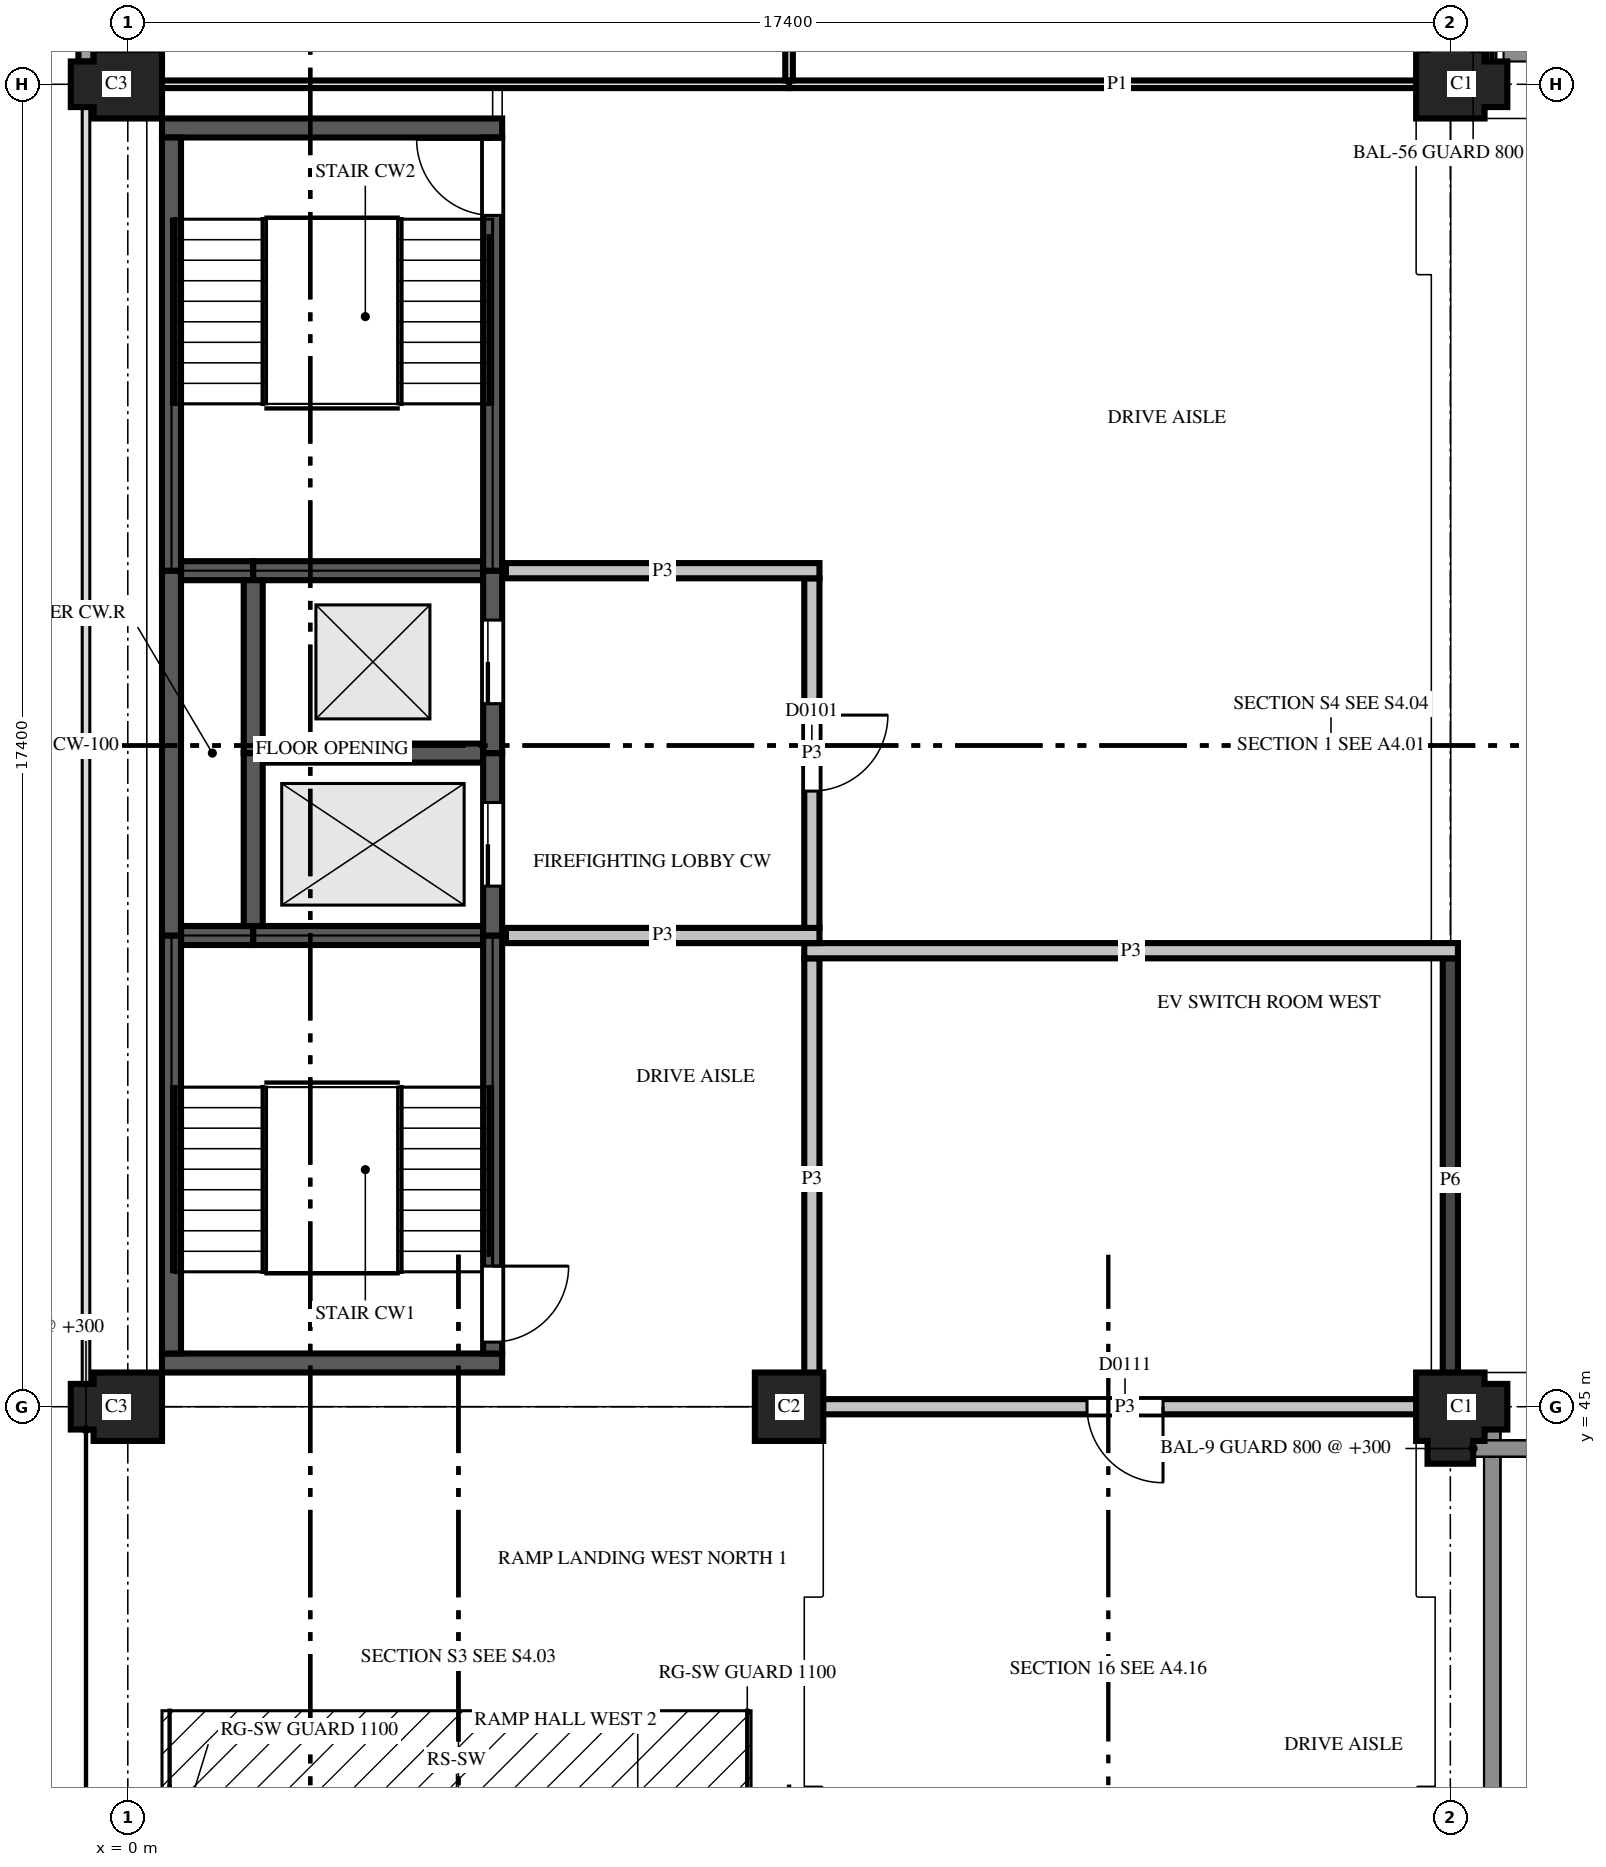
"""IFC4 building model, lengths in metres.
Left out: names, types, materials, properties, quantities, classifications, styles, units other than length and angle.
Written with IfcOpenShell. Run it as: python <this file> out.ifc"""

import sys

from ifc_helpers import new_model, si_unit, direction, frame, frame_2d, origin, place, context, subcontext, project, spatial, polyline, rectangle, outline, extrude, element, fill, save


model = new_model("IFC4")
c1 = context("Model", 3, precision=1e-05, world=origin(), true_north=direction((0.0, 1.0)))
c2 = subcontext(c1, "Body", "Model", "MODEL_VIEW")
j1 = project(units=[si_unit("LENGTHUNIT", "METRE"), si_unit("PLANEANGLEUNIT", "RADIAN")], contexts=[c1])
p1 = place(None, origin())
s1 = spatial("IfcSite", under=j1, at=p1, CompositionType="ELEMENT")
p2 = place(p1, origin())
s2 = spatial("IfcBuilding", under=s1, at=p2, CompositionType="ELEMENT")
p3 = place(p2, frame((0.0, 0.0, 4.5)))
s3 = spatial("IfcBuildingStorey", under=s2, at=p3, CompositionType="ELEMENT", Elevation=4.5)
p4 = place(p3, frame((0.0, 45.0, 0.0), z_axis=(0.0, 0.0, 1.0), x_axis=(-1.0, 0.0, 0.0)))
e1 = element("IfcColumn", 1, at=p4, inside=s3, PredefinedType="COLUMN", context=c2, shape_type="SweptSolid", body=[
    extrude(outline(polyline([(-0.45, -0.45), (0.45, -0.45), (0.45, -0.3), (0.75, -0.3), (0.75, 0.3), (0.45, 0.3), (0.45, 0.45), (-0.45, 0.45), (-0.45, -0.45)])), origin(), (0.0, 0.0, 1.0), 3.7),
])
p5 = place(p3, frame((8.7, 45.0, 0.0), z_axis=(0.0, 0.0, 1.0), x_axis=(1.0, 0.0, 0.0)))
e2 = element("IfcColumn", 2, at=p5, inside=s3, PredefinedType="COLUMN", context=c2, shape_type="SweptSolid", body=[
    extrude(outline(polyline([(-0.45, -0.45), (0.45, -0.45), (0.45, 0.45), (-0.45, 0.45), (-0.45, -0.45)])), origin(), (0.0, 0.0, 1.0), 3.7),
])
p6 = place(p3, frame((17.4, 45.0, 0.0), z_axis=(0.0, 0.0, 1.0), x_axis=(0.0, -1.0, 0.0)))
e3 = element("IfcColumn", 3, at=p6, inside=s3, PredefinedType="COLUMN", context=c2, shape_type="SweptSolid", body=[
    extrude(outline(polyline([(-0.45, -0.45), (0.45, -0.45), (0.45, -0.3), (0.75, -0.3), (0.75, 0.3), (0.45, 0.3), (0.45, 0.45), (0.3, 0.45), (0.3, 0.75), (-0.3, 0.75), (-0.3, 0.45), (-0.45, 0.45), (-0.45, -0.45)])), origin(), (0.0, 0.0, 1.0), 3.7),
])
p7 = place(p3, frame((0.0, 62.4, 0.0), z_axis=(0.0, 0.0, 1.0), x_axis=(-1.0, 0.0, 0.0)))
e4 = element("IfcColumn", 4, at=p7, inside=s3, PredefinedType="COLUMN", context=c2, shape_type="SweptSolid", body=[
    extrude(outline(polyline([(-0.45, -0.45), (0.45, -0.45), (0.45, -0.3), (0.75, -0.3), (0.75, 0.3), (0.45, 0.3), (0.45, 0.45), (-0.45, 0.45), (-0.45, -0.45)])), origin(), (0.0, 0.0, 1.0), 3.7),
])
p8 = place(p3, frame((17.4, 62.4, 0.0), z_axis=(0.0, 0.0, 1.0), x_axis=(1.0, 0.0, 0.0)))
e5 = element("IfcColumn", 5, at=p8, inside=s3, PredefinedType="COLUMN", context=c2, shape_type="SweptSolid", body=[
    extrude(outline(polyline([(-0.45, -0.45), (0.45, -0.45), (0.45, -0.3), (0.75, -0.3), (0.75, 0.3), (0.45, 0.3), (0.45, 0.45), (0.3, 0.45), (0.3, 0.75), (-0.3, 0.75), (-0.3, 0.45), (-0.45, 0.45), (-0.45, -0.45)])), origin(), (0.0, 0.0, 1.0), 3.7),
])
p9 = place(p3, frame((0.45, 45.575, 0.0), z_axis=(0.0, 0.0, 1.0), x_axis=(1.0, 0.0, 0.0)))
e6 = element("IfcWall", 6, at=p9, inside=s3, PredefinedType="SHEAR", context=c2, shape_type="SweptSolid", body=[
    extrude(rectangle(XDim=4.475, YDim=0.25, at=frame_2d((2.238, 0.0))), origin(), (0.0, 0.0, 1.0), 3.7),
])
p10 = place(p3, frame((0.7, 51.2, 0.0), z_axis=(0.0, 0.0, 1.0), x_axis=(1.0, 0.0, 0.0)))
e7 = element("IfcWall", 7, at=p10, inside=s3, PredefinedType="SHEAR", context=c2, shape_type="SweptSolid", body=[
    extrude(rectangle(XDim=0.95, YDim=0.25, at=frame_2d((0.475, 0.0))), origin(), (0.0, 0.0, 1.0), 3.7),
])
p11 = place(p3, frame((1.65, 51.2, 0.0), z_axis=(0.0, 0.0, 1.0), x_axis=(1.0, 0.0, 0.0)))
e8 = element("IfcWall", 8, at=p11, inside=s3, PredefinedType="SHEAR", context=c2, shape_type="SweptSolid", body=[
    extrude(rectangle(XDim=3.025, YDim=0.25, at=frame_2d((1.513, 0.0))), origin(), (0.0, 0.0, 1.0), 3.7),
])
p12 = place(p3, frame((1.775, 53.6, 0.0), z_axis=(0.0, 0.0, 1.0), x_axis=(1.0, 0.0, 0.0)))
e9 = element("IfcWall", 9, at=p12, inside=s3, PredefinedType="SHEAR", context=c2, shape_type="SweptSolid", body=[
    extrude(rectangle(XDim=2.9, YDim=0.25, at=frame_2d((1.45, 0.0))), origin(), (0.0, 0.0, 1.0), 3.7),
])
p13 = place(p3, frame((0.7, 56.0, 0.0), z_axis=(0.0, 0.0, 1.0), x_axis=(1.0, 0.0, 0.0)))
e10 = element("IfcWall", 10, at=p13, inside=s3, PredefinedType="SHEAR", context=c2, shape_type="SweptSolid", body=[
    extrude(rectangle(XDim=0.95, YDim=0.25, at=frame_2d((0.475, 0.0))), origin(), (0.0, 0.0, 1.0), 3.7),
])
p14 = place(p3, frame((1.65, 56.0, 0.0), z_axis=(0.0, 0.0, 1.0), x_axis=(1.0, 0.0, 0.0)))
e11 = element("IfcWall", 11, at=p14, inside=s3, PredefinedType="SHEAR", context=c2, shape_type="SweptSolid", body=[
    extrude(rectangle(XDim=3.025, YDim=0.25, at=frame_2d((1.513, 0.0))), origin(), (0.0, 0.0, 1.0), 3.7),
])
p15 = place(p3, frame((0.45, 61.825, 0.0), z_axis=(0.0, 0.0, 1.0), x_axis=(1.0, 0.0, 0.0)))
e12 = element("IfcWall", 12, at=p15, inside=s3, PredefinedType="SHEAR", context=c2, shape_type="SweptSolid", body=[
    extrude(rectangle(XDim=4.475, YDim=0.25, at=frame_2d((2.238, 0.0))), origin(), (0.0, 0.0, 1.0), 3.7),
])
p16 = place(p3, frame((0.575, 45.7, 0.0), z_axis=(0.0, 0.0, 1.0), x_axis=(0.0, 1.0, 0.0)))
e13 = element("IfcWall", 13, at=p16, inside=s3, PredefinedType="SHEAR", context=c2, shape_type="SweptSolid", body=[
    extrude(rectangle(XDim=5.5, YDim=0.25, at=frame_2d((2.75, 0.0))), origin(), (0.0, 0.0, 1.0), 3.7),
])
p17 = place(p3, frame((0.575, 51.2, 0.0), z_axis=(0.0, 0.0, 1.0), x_axis=(0.0, 1.0, 0.0)))
e14 = element("IfcWall", 14, at=p17, inside=s3, PredefinedType="SHEAR", context=c2, shape_type="SweptSolid", body=[
    extrude(rectangle(XDim=4.8, YDim=0.25, at=frame_2d((2.4, 0.0))), origin(), (0.0, 0.0, 1.0), 3.7),
])
p18 = place(p3, frame((0.575, 56.0, 0.0), z_axis=(0.0, 0.0, 1.0), x_axis=(0.0, 1.0, 0.0)))
e15 = element("IfcWall", 15, at=p18, inside=s3, PredefinedType="SHEAR", context=c2, shape_type="SweptSolid", body=[
    extrude(rectangle(XDim=5.7, YDim=0.25, at=frame_2d((2.85, 0.0))), origin(), (0.0, 0.0, 1.0), 3.7),
])
p19 = place(p3, frame((1.65, 51.325, 0.0), z_axis=(0.0, 0.0, 1.0), x_axis=(0.0, 1.0, 0.0)))
e16 = element("IfcWall", 16, at=p19, inside=s3, PredefinedType="SHEAR", context=c2, shape_type="SweptSolid", body=[
    extrude(rectangle(XDim=2.275, YDim=0.25, at=frame_2d((1.138, 0.0))), origin(), (0.0, 0.0, 1.0), 3.7),
])
p20 = place(p3, frame((1.65, 53.6, 0.0), z_axis=(0.0, 0.0, 1.0), x_axis=(0.0, 1.0, 0.0)))
e17 = element("IfcWall", 17, at=p20, inside=s3, PredefinedType="SHEAR", context=c2, shape_type="SweptSolid", body=[
    extrude(rectangle(XDim=2.275, YDim=0.25, at=frame_2d((1.137, 0.0))), origin(), (0.0, 0.0, 1.0), 3.7),
])
p21 = place(p3, frame((4.8, 45.7, 0.0), z_axis=(0.0, 0.0, 1.0), x_axis=(0.0, 1.0, 0.0)))
e18 = element("IfcWall", 18, at=p21, inside=s3, PredefinedType="SHEAR", context=c2, shape_type="SweptSolid", body=[
    extrude(rectangle(XDim=5.5, YDim=0.25, at=frame_2d((2.75, 0.0))), origin(), (0.0, 0.0, 1.0), 3.7),
])
p22 = place(p21, frame((0.15, 0.0, 0.0)))
e19 = element("IfcOpeningElement", 19, at=p22, cuts=e18, PredefinedType="OPENING", context=c2, shape_type="SweptSolid", body=[
    extrude(rectangle(XDim=1.0, YDim=2.1, at=frame_2d((0.5, 1.05))), frame((0.0, 0.135, 0.0), z_axis=(0.0, -1.0, 0.0), x_axis=(1.0, 0.0, 0.0)), (0.0, 0.0, 1.0), 0.27),
])
p23 = place(p3, frame((4.8, 51.2, 0.0), z_axis=(0.0, 0.0, 1.0), x_axis=(0.0, 1.0, 0.0)))
e20 = element("IfcWall", 20, at=p23, inside=s3, PredefinedType="SHEAR", context=c2, shape_type="SweptSolid", body=[
    extrude(rectangle(XDim=2.4, YDim=0.25, at=frame_2d((1.2, 0.0))), origin(), (0.0, 0.0, 1.0), 3.7),
])
p24 = place(p23, frame((0.65, 0.0, 0.0)))
e21 = element("IfcOpeningElement", 21, at=p24, cuts=e20, PredefinedType="OPENING", context=c2, shape_type="SweptSolid", body=[
    extrude(rectangle(XDim=1.1, YDim=2.1, at=frame_2d((0.55, 1.05))), frame((0.0, 0.135, 0.0), z_axis=(0.0, -1.0, 0.0), x_axis=(1.0, 0.0, 0.0)), (0.0, 0.0, 1.0), 0.27),
])
p25 = place(p3, frame((4.8, 53.6, 0.0), z_axis=(0.0, 0.0, 1.0), x_axis=(0.0, 1.0, 0.0)))
e22 = element("IfcWall", 22, at=p25, inside=s3, PredefinedType="SHEAR", context=c2, shape_type="SweptSolid", body=[
    extrude(rectangle(XDim=2.4, YDim=0.25, at=frame_2d((1.2, 0.0))), origin(), (0.0, 0.0, 1.0), 3.7),
])
p26 = place(p25, frame((0.65, 0.0, 0.0)))
e23 = element("IfcOpeningElement", 23, at=p26, cuts=e22, PredefinedType="OPENING", context=c2, shape_type="SweptSolid", body=[
    extrude(rectangle(XDim=1.1, YDim=2.1, at=frame_2d((0.55, 1.05))), frame((0.0, 0.135, 0.0), z_axis=(0.0, -1.0, 0.0), x_axis=(1.0, 0.0, 0.0)), (0.0, 0.0, 1.0), 0.27),
])
p27 = place(p3, frame((4.8, 56.0, 0.0), z_axis=(0.0, 0.0, 1.0), x_axis=(0.0, 1.0, 0.0)))
e24 = element("IfcWall", 24, at=p27, inside=s3, PredefinedType="SHEAR", context=c2, shape_type="SweptSolid", body=[
    extrude(rectangle(XDim=5.7, YDim=0.25, at=frame_2d((2.85, 0.0))), origin(), (0.0, 0.0, 1.0), 3.7),
])
p28 = place(p27, frame((4.675, 0.0, 0.0)))
e25 = element("IfcOpeningElement", 25, at=p28, cuts=e24, PredefinedType="OPENING", context=c2, shape_type="SweptSolid", body=[
    extrude(rectangle(XDim=1.0, YDim=2.1, at=frame_2d((0.5, 1.05))), frame((0.0, 0.135, 0.0), z_axis=(0.0, -1.0, 0.0), x_axis=(1.0, 0.0, 0.0)), (0.0, 0.0, 1.0), 0.27),
])
p29 = place(p3, frame((-0.55, 69.6, 0.0), z_axis=(0.0, 0.0, 1.0), x_axis=(0.0, -1.0, 0.0)))
e26 = element("IfcWall", 26, at=p29, inside=s3, PredefinedType="SOLIDWALL", context=c2, shape_type="SweptSolid", body=[
    extrude(rectangle(XDim=6.9, YDim=0.2, at=frame_2d((3.45, 0.0))), origin(), (0.0, 0.0, 1.0), 2.3),
])
p30 = place(p29, frame((2.25, 0.0, 0.55)))
e27 = element("IfcOpeningElement", 27, at=p30, cuts=e26, PredefinedType="OPENING", context=c2, shape_type="SweptSolid", body=[
    extrude(rectangle(XDim=2.4, YDim=1.0, at=frame_2d((1.2, 0.5))), frame((0.0, 0.11, 0.0), z_axis=(0.0, -1.0, 0.0), x_axis=(1.0, 0.0, 0.0)), (0.0, 0.0, 1.0), 0.22),
])
p31 = place(p3, frame((8.9, 45.0, 0.0), z_axis=(0.0, 0.0, 1.0), x_axis=(1.0, 0.0, 0.0)))
e28 = element("IfcWall", 28, at=p31, inside=s3, PredefinedType="PARTITIONING", context=c2, shape_type="SweptSolid", body=[
    extrude(rectangle(XDim=8.44, YDim=0.2, at=frame_2d((4.22, 0.0))), origin(), (0.0, 0.0, 1.0), 2.88),
])
p32 = place(p31, frame((3.72, 0.0, 0.0)))
e29 = element("IfcOpeningElement", 29, at=p32, cuts=e28, PredefinedType="OPENING", context=c2, shape_type="SweptSolid", body=[
    extrude(rectangle(XDim=1.0, YDim=2.1, at=frame_2d((0.5, 1.05))), frame((0.0, 0.11, 0.0), z_axis=(0.0, -1.0, 0.0), x_axis=(1.0, 0.0, 0.0)), (0.0, 0.0, 1.0), 0.22),
])
p33 = place(p3, frame((17.4, 45.06, 0.0), z_axis=(0.0, 0.0, 1.0), x_axis=(0.0, 1.0, 0.0)))
e30 = element("IfcWall", 30, at=p33, inside=s3, PredefinedType="PARTITIONING", context=c2, shape_type="SweptSolid", body=[
    extrude(rectangle(XDim=5.84, YDim=0.2, at=frame_2d((2.92, 0.0))), origin(), (0.0, 0.0, 1.0), 2.2),
])
p34 = place(p3, frame((9.0, 50.9, 0.0), z_axis=(0.0, 0.0, 1.0), x_axis=(0.0, -1.0, 0.0)))
e31 = element("IfcWall", 31, at=p34, inside=s3, PredefinedType="PARTITIONING", context=c2, shape_type="SweptSolid", body=[
    extrude(rectangle(XDim=5.8, YDim=0.2, at=frame_2d((2.9, 0.0))), origin(), (0.0, 0.0, 1.0), 2.88),
])
p35 = place(p3, frame((17.5, 51.0, 0.0), z_axis=(0.0, 0.0, 1.0), x_axis=(-1.0, 0.0, 0.0)))
e32 = element("IfcWall", 32, at=p35, inside=s3, PredefinedType="PARTITIONING", context=c2, shape_type="SweptSolid", body=[
    extrude(rectangle(XDim=8.6, YDim=0.2, at=frame_2d((4.3, 0.0))), origin(), (0.0, 0.0, 1.0), 2.88),
])
p36 = place(p3, frame((4.975, 51.2, 0.0), z_axis=(0.0, 0.0, 1.0), x_axis=(1.0, 0.0, 0.0)))
e33 = element("IfcWall", 33, at=p36, inside=s3, PredefinedType="PARTITIONING", context=c2, shape_type="SweptSolid", body=[
    extrude(rectangle(XDim=4.125, YDim=0.2, at=frame_2d((2.062, 0.0))), origin(), (0.0, 0.0, 1.0), 2.88),
])
p37 = place(p3, frame((9.0, 51.3, 0.0), z_axis=(0.0, 0.0, 1.0), x_axis=(0.0, 1.0, 0.0)))
e34 = element("IfcWall", 34, at=p37, inside=s3, PredefinedType="PARTITIONING", context=c2, shape_type="SweptSolid", body=[
    extrude(rectangle(XDim=4.6, YDim=0.2, at=frame_2d((2.3, 0.0))), origin(), (0.0, 0.0, 1.0), 2.88),
])
p38 = place(p37, frame((1.8, 0.0, 0.0)))
e35 = element("IfcOpeningElement", 35, at=p38, cuts=e34, PredefinedType="OPENING", context=c2, shape_type="SweptSolid", body=[
    extrude(rectangle(XDim=1.0, YDim=2.1, at=frame_2d((0.5, 1.05))), frame((0.0, 0.11, 0.0), z_axis=(0.0, -1.0, 0.0), x_axis=(1.0, 0.0, 0.0)), (0.0, 0.0, 1.0), 0.22),
])
p39 = place(p3, frame((9.1, 56.0, 0.0), z_axis=(0.0, 0.0, 1.0), x_axis=(-1.0, 0.0, 0.0)))
e36 = element("IfcWall", 36, at=p39, inside=s3, PredefinedType="PARTITIONING", context=c2, shape_type="SweptSolid", body=[
    extrude(rectangle(XDim=4.125, YDim=0.2, at=frame_2d((2.062, 0.0))), origin(), (0.0, 0.0, 1.0), 2.88),
])
p40 = place(p3, frame((0.06, 62.4, 0.0), z_axis=(0.0, 0.0, 1.0), x_axis=(1.0, 0.0, 0.0)))
e37 = element("IfcWall", 37, at=p40, inside=s3, PredefinedType="PARTITIONING", context=c2, shape_type="SweptSolid", body=[
    extrude(rectangle(XDim=8.64, YDim=0.1, at=frame_2d((4.32, 0.0))), origin(), (0.0, 0.0, 1.0), 2.88),
])
p41 = place(p3, frame((8.7, 62.4, 0.0), z_axis=(0.0, 0.0, 1.0), x_axis=(1.0, 0.0, 0.0)))
e38 = element("IfcWall", 38, at=p41, inside=s3, PredefinedType="PARTITIONING", context=c2, shape_type="SweptSolid", body=[
    extrude(rectangle(XDim=8.64, YDim=0.1, at=frame_2d((4.32, 0.0))), origin(), (0.0, 0.0, 1.0), 2.88),
])
p42 = place(p3, frame((8.7, 62.45, 0.0), z_axis=(0.0, 0.0, 1.0), x_axis=(0.0, 1.0, 0.0)))
e39 = element("IfcWall", 39, at=p42, inside=s3, PredefinedType="PARTITIONING", context=c2, shape_type="SweptSolid", body=[
    extrude(rectangle(XDim=22.4, YDim=0.1, at=frame_2d((11.2, 0.0))), origin(), (0.0, 0.0, 1.0), 2.88),
])
p43 = place(p38, origin())
e40 = element("IfcDoor", 40, at=p43, inside=s3, OperationType="SINGLE_SWING_RIGHT", PredefinedType="DOOR", context=c2, shape_type="SweptSolid", body=[
    extrude(rectangle(XDim=1.0, YDim=2.1, at=frame_2d((0.5, 1.05))), frame((0.0, 0.025, 0.0), z_axis=(0.0, -1.0, 0.0), x_axis=(1.0, 0.0, 0.0)), (0.0, 0.0, 1.0), 0.05),
])
fill(e35, e40)
p44 = place(p32, origin())
e41 = element("IfcDoor", 41, at=p44, inside=s3, OperationType="SINGLE_SWING_RIGHT", PredefinedType="DOOR", context=c2, shape_type="SweptSolid", body=[
    extrude(rectangle(XDim=1.0, YDim=2.1, at=frame_2d((0.5, 1.05))), frame((0.0, 0.025, 0.0), z_axis=(0.0, -1.0, 0.0), x_axis=(1.0, 0.0, 0.0)), (0.0, 0.0, 1.0), 0.05),
])
fill(e29, e41)
p45 = place(p24, origin())
e42 = element("IfcDoor", 42, at=p45, inside=s3, OperationType="SLIDING_TO_LEFT", PredefinedType="DOOR", context=c2, shape_type="SweptSolid", body=[
    extrude(rectangle(XDim=1.1, YDim=2.1, at=frame_2d((0.55, 1.05))), frame((0.0, 0.025, 0.0), z_axis=(0.0, -1.0, 0.0), x_axis=(1.0, 0.0, 0.0)), (0.0, 0.0, 1.0), 0.05),
])
fill(e21, e42)
p46 = place(p26, origin())
e43 = element("IfcDoor", 43, at=p46, inside=s3, OperationType="SLIDING_TO_LEFT", PredefinedType="DOOR", context=c2, shape_type="SweptSolid", body=[
    extrude(rectangle(XDim=1.1, YDim=2.1, at=frame_2d((0.55, 1.05))), frame((0.0, 0.025, 0.0), z_axis=(0.0, -1.0, 0.0), x_axis=(1.0, 0.0, 0.0)), (0.0, 0.0, 1.0), 0.05),
])
fill(e23, e43)
p47 = place(p28, origin())
e44 = element("IfcDoor", 44, at=p47, inside=s3, OperationType="SINGLE_SWING_LEFT", PredefinedType="DOOR", context=c2, shape_type="SweptSolid", body=[
    extrude(rectangle(XDim=1.0, YDim=2.1, at=frame_2d((0.5, 1.05))), frame((0.0, 0.025, 0.0), z_axis=(0.0, -1.0, 0.0), x_axis=(1.0, 0.0, 0.0)), (0.0, 0.0, 1.0), 0.05),
])
fill(e25, e44)
p48 = place(p22, origin())
e45 = element("IfcDoor", 45, at=p48, inside=s3, OperationType="SINGLE_SWING_RIGHT", PredefinedType="DOOR", context=c2, shape_type="SweptSolid", body=[
    extrude(rectangle(XDim=1.0, YDim=2.1, at=frame_2d((0.5, 1.05))), frame((0.0, 0.025, 0.0), z_axis=(0.0, -1.0, 0.0), x_axis=(1.0, 0.0, 0.0)), (0.0, 0.0, 1.0), 0.05),
])
fill(e19, e45)
save(model, sys.argv[1])
